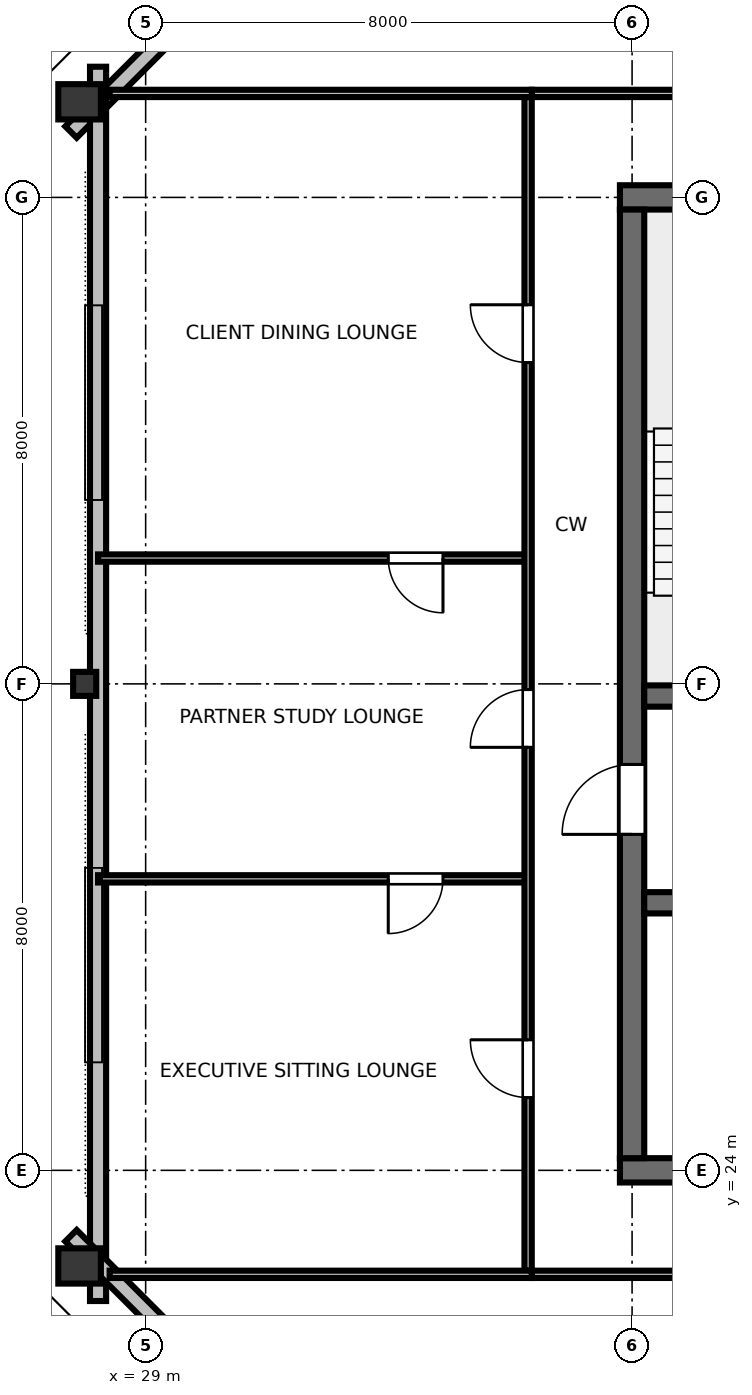
"""IFC4 building model, lengths in metres.
Left out: names, types, materials, properties, quantities, classifications, styles, units other than length and angle.
Written with IfcOpenShell. Run it as: python <this file> out.ifc"""

import sys

from ifc_helpers import new_model, si_unit, direction, frame, frame_2d, origin, origin_2d, place, context, subcontext, project, spatial, rectangle, hollow_rectangle, i_section, extrude, element, fill, save


model = new_model("IFC4")
c1 = context("Model", 3, precision=1e-05, world=origin(), true_north=direction((0.0, 1.0)))
c2 = subcontext(c1, "Body", "Model", "MODEL_VIEW")
j1 = project(units=[si_unit("LENGTHUNIT", "METRE"), si_unit("PLANEANGLEUNIT", "RADIAN")], contexts=[c1])
p1 = place(None, origin())
s1 = spatial("IfcSite", under=j1, at=p1, CompositionType="ELEMENT")
p2 = place(p1, origin())
s2 = spatial("IfcBuilding", under=s1, at=p2, CompositionType="ELEMENT")
p3 = place(p2, frame((0.0, 0.0, 261.0)))
s3 = spatial("IfcBuildingStorey", under=s2, at=p3, CompositionType="ELEMENT", Elevation=261.0)
p4 = place(p3, frame((36.8, 24.0, 0.0), z_axis=(0.0, 0.0, 1.0), x_axis=(1.0, 0.0, 0.0)))
e1 = element("IfcWall", 1, at=p4, inside=s3, PredefinedType="SHEAR", context=c2, shape_type="SweptSolid", body=[
    extrude(rectangle(XDim=18.4, YDim=0.4, at=frame_2d((9.2, 0.0))), origin(), (0.0, 0.0, 1.0), 3.36),
])
p5 = place(p4, frame((13.4, 0.0, 0.0)))
e2 = element("IfcOpeningElement", 2, at=p5, cuts=e1, PredefinedType="OPENING", context=c2, shape_type="SweptSolid", body=[
    extrude(rectangle(XDim=1.6, YDim=2.15, at=frame_2d((0.8, 1.075))), frame((0.0, 0.21, 0.0), z_axis=(0.0, -1.0, 0.0), x_axis=(1.0, 0.0, 0.0)), (0.0, 0.0, 1.0), 0.42),
])
p6 = place(p3, frame((36.8, 40.0, 0.0), z_axis=(0.0, 0.0, 1.0), x_axis=(1.0, 0.0, 0.0)))
e3 = element("IfcWall", 3, at=p6, inside=s3, PredefinedType="SHEAR", context=c2, shape_type="SweptSolid", body=[
    extrude(rectangle(XDim=18.4, YDim=0.4, at=frame_2d((9.2, 0.0))), origin(), (0.0, 0.0, 1.0), 3.36),
])
p7 = place(p6, frame((8.7, 0.0, 0.0)))
e4 = element("IfcOpeningElement", 4, at=p7, cuts=e3, PredefinedType="OPENING", context=c2, shape_type="SweptSolid", body=[
    extrude(rectangle(XDim=1.0, YDim=2.15, at=frame_2d((0.5, 1.075))), frame((0.0, 0.21, 0.0), z_axis=(0.0, -1.0, 0.0), x_axis=(1.0, 0.0, 0.0)), (0.0, 0.0, 1.0), 0.42),
])
p8 = place(p3, frame((37.0, 24.2, 0.0), z_axis=(0.0, 0.0, 1.0), x_axis=(0.0, 1.0, 0.0)))
e5 = element("IfcWall", 5, at=p8, inside=s3, PredefinedType="SHEAR", context=c2, shape_type="SweptSolid", body=[
    extrude(rectangle(XDim=15.6, YDim=0.4, at=frame_2d((7.8, 0.0))), origin(), (0.0, 0.0, 1.0), 3.36),
])
p9 = place(p8, frame((5.325, 0.0, 0.0)))
e6 = element("IfcOpeningElement", 6, at=p9, cuts=e5, PredefinedType="OPENING", context=c2, shape_type="SweptSolid", body=[
    extrude(rectangle(XDim=1.15, YDim=2.15, at=frame_2d((0.575, 1.075))), frame((0.0, 0.21, 0.0), z_axis=(0.0, -1.0, 0.0), x_axis=(1.0, 0.0, 0.0)), (0.0, 0.0, 1.0), 0.42),
])
p10 = place(p3, frame((37.2, 31.8, 0.0), z_axis=(0.0, 0.0, 1.0), x_axis=(1.0, 0.0, 0.0)))
e7 = element("IfcWall", 7, at=p10, inside=s3, PredefinedType="SHEAR", context=c2, shape_type="SweptSolid", body=[
    extrude(rectangle(XDim=17.6, YDim=0.35, at=frame_2d((8.8, 0.0))), origin(), (0.0, 0.0, 1.0), 3.36),
])
p11 = place(p10, frame((0.85, 0.0, 0.0)))
e8 = element("IfcOpeningElement", 8, at=p11, cuts=e7, PredefinedType="OPENING", context=c2, shape_type="SweptSolid", body=[
    extrude(rectangle(XDim=1.1, YDim=2.15, at=frame_2d((0.55, 1.075))), frame((0.0, 0.185, 0.0), z_axis=(0.0, -1.0, 0.0), x_axis=(1.0, 0.0, 0.0)), (0.0, 0.0, 1.0), 0.37),
])
p12 = place(p10, frame((14.75, 0.0, 0.0)))
e9 = element("IfcOpeningElement", 9, at=p12, cuts=e7, PredefinedType="OPENING", context=c2, shape_type="SweptSolid", body=[
    extrude(rectangle(XDim=1.1, YDim=2.15, at=frame_2d((0.55, 1.075))), frame((0.0, 0.185, 0.0), z_axis=(0.0, -1.0, 0.0), x_axis=(1.0, 0.0, 0.0)), (0.0, 0.0, 1.0), 0.37),
])
p13 = place(p3, frame((37.2, 28.4, 0.0), z_axis=(0.0, 0.0, 1.0), x_axis=(1.0, 0.0, 0.0)))
e10 = element("IfcWall", 10, at=p13, inside=s3, PredefinedType="SHEAR", context=c2, shape_type="SweptSolid", body=[
    extrude(rectangle(XDim=17.6, YDim=0.35, at=frame_2d((8.8, 0.0))), origin(), (0.0, 0.0, 1.0), 3.36),
])
p14 = place(p3, frame((27.914, 41.572, 0.0), z_axis=(0.0, 0.0, 1.0), x_axis=(0.0, 1.0, 0.0)))
e11 = element("IfcColumn", 11, at=p14, inside=s3, PredefinedType="COLUMN", context=c2, shape_type="SweptSolid", body=[
    extrude(hollow_rectangle(XDim=0.58, YDim=0.7, WallThickness=0.032, at=origin_2d()), origin(), (0.0, 0.0, 1.0), 3.373),
])
p15 = place(p3, frame((27.997, 32.0, 0.0), z_axis=(0.0, 0.0, 1.0), x_axis=(0.0, 1.0, 0.0)))
e12 = element("IfcColumn", 12, at=p15, inside=s3, PredefinedType="COLUMN", context=c2, shape_type="SweptSolid", body=[
    extrude(i_section(OverallWidth=0.395, OverallDepth=0.38, WebThickness=0.019, FlangeThickness=0.03, FilletRadius=0.025, at=origin_2d()), origin(), (0.0, 0.0, 1.0), 3.373),
])
p16 = place(p3, frame((27.914, 22.428, 0.0), z_axis=(0.0, 0.0, 1.0), x_axis=(0.0, 1.0, 0.0)))
e13 = element("IfcColumn", 13, at=p16, inside=s3, PredefinedType="COLUMN", context=c2, shape_type="SweptSolid", body=[
    extrude(hollow_rectangle(XDim=0.58, YDim=0.7, WallThickness=0.032, at=origin_2d()), origin(), (0.0, 0.0, 1.0), 3.373),
])
p17 = place(p3, frame((35.53, 48.832, 0.0), z_axis=(0.0, 0.0, 1.0), x_axis=(-0.707106781187, -0.707106781187, 0.0)))
e14 = element("IfcWall", 14, at=p17, inside=s3, PredefinedType="STANDARD", context=c2, shape_type="SweptSolid", body=[
    extrude(rectangle(XDim=10.971, YDim=0.265, at=frame_2d((5.485, 0.0))), origin(), (0.0, 0.0, 1.0), 2.832),
])
p18 = place(p3, frame((28.217, 42.149, 0.0), z_axis=(0.0, 0.0, 1.0), x_axis=(0.0, -1.0, 0.0)))
e15 = element("IfcWall", 15, at=p18, inside=s3, PredefinedType="STANDARD", context=c2, shape_type="SweptSolid", body=[
    extrude(rectangle(XDim=20.298, YDim=0.265, at=frame_2d((10.149, 0.0))), origin(), (0.0, 0.0, 1.0), 2.832),
])
p19 = place(p3, frame((27.772, 22.925, 0.0), z_axis=(0.0, 0.0, 1.0), x_axis=(0.707106781187, -0.707106781187, 0.0)))
e16 = element("IfcWall", 16, at=p19, inside=s3, PredefinedType="STANDARD", context=c2, shape_type="SweptSolid", body=[
    extrude(rectangle(XDim=10.971, YDim=0.265, at=frame_2d((5.485, 0.0))), origin(), (0.0, 0.0, 1.0), 2.832),
])
p20 = place(p3, frame((35.35, 22.29, 0.0), z_axis=(0.0, 0.0, 1.0), x_axis=(1.0, 0.0, 0.0)))
e17 = element("IfcWall", 17, at=p20, inside=s3, PredefinedType="PARTITIONING", context=c2, shape_type="SweptSolid", body=[
    extrude(rectangle(XDim=21.3, YDim=0.12, at=frame_2d((10.65, 0.0))), origin(), (0.0, 0.0, 1.0), 2.655),
])
p21 = place(p20, frame((4.425, 0.0, 0.0)))
e18 = element("IfcOpeningElement", 18, at=p21, cuts=e17, PredefinedType="OPENING", context=c2, shape_type="SweptSolid", body=[
    extrude(rectangle(XDim=0.95, YDim=2.15, at=frame_2d((0.475, 1.075))), frame((0.0, 0.07, 0.0), z_axis=(0.0, -1.0, 0.0), x_axis=(1.0, 0.0, 0.0)), (0.0, 0.0, 1.0), 0.14),
])
p22 = place(p20, frame((13.051, 0.0, 0.0)))
e19 = element("IfcOpeningElement", 19, at=p22, cuts=e17, PredefinedType="OPENING", context=c2, shape_type="SweptSolid", body=[
    extrude(rectangle(XDim=0.95, YDim=2.15, at=frame_2d((0.475, 1.075))), frame((0.0, 0.07, 0.0), z_axis=(0.0, -1.0, 0.0), x_axis=(1.0, 0.0, 0.0)), (0.0, 0.0, 1.0), 0.14),
])
p23 = place(p20, frame((17.811, 0.0, 0.0)))
e20 = element("IfcOpeningElement", 20, at=p23, cuts=e17, PredefinedType="OPENING", context=c2, shape_type="SweptSolid", body=[
    extrude(rectangle(XDim=0.95, YDim=2.15, at=frame_2d((0.475, 1.075))), frame((0.0, 0.07, 0.0), z_axis=(0.0, -1.0, 0.0), x_axis=(1.0, 0.0, 0.0)), (0.0, 0.0, 1.0), 0.14),
])
p24 = place(p3, frame((35.35, 41.71, 0.0), z_axis=(0.0, 0.0, 1.0), x_axis=(1.0, 0.0, 0.0)))
e21 = element("IfcWall", 21, at=p24, inside=s3, PredefinedType="PARTITIONING", context=c2, shape_type="SweptSolid", body=[
    extrude(rectangle(XDim=21.3, YDim=0.12, at=frame_2d((10.65, 0.0))), origin(), (0.0, 0.0, 1.0), 2.655),
])
p25 = place(p24, frame((4.361, 0.0, 0.0)))
e22 = element("IfcOpeningElement", 22, at=p25, cuts=e21, PredefinedType="OPENING", context=c2, shape_type="SweptSolid", body=[
    extrude(rectangle(XDim=0.95, YDim=2.15, at=frame_2d((0.475, 1.075))), frame((0.0, 0.07, 0.0), z_axis=(0.0, -1.0, 0.0), x_axis=(1.0, 0.0, 0.0)), (0.0, 0.0, 1.0), 0.14),
])
p26 = place(p24, frame((15.925, 0.0, 0.0)))
e23 = element("IfcOpeningElement", 23, at=p26, cuts=e21, PredefinedType="OPENING", context=c2, shape_type="SweptSolid", body=[
    extrude(rectangle(XDim=0.95, YDim=2.15, at=frame_2d((0.475, 1.075))), frame((0.0, 0.07, 0.0), z_axis=(0.0, -1.0, 0.0), x_axis=(1.0, 0.0, 0.0)), (0.0, 0.0, 1.0), 0.14),
])
p27 = place(p3, frame((35.29, 28.794, 0.0), z_axis=(0.0, 0.0, 1.0), x_axis=(-1.0, 0.0, 0.0)))
e24 = element("IfcWall", 24, at=p27, inside=s3, PredefinedType="PARTITIONING", context=c2, shape_type="SweptSolid", body=[
    extrude(rectangle(XDim=7.073, YDim=0.12, at=frame_2d((3.536, 0.0))), origin(), (0.0, 0.0, 1.0), 2.655),
])
p28 = place(p27, frame((1.4, 0.0, 0.0)))
e25 = element("IfcOpeningElement", 25, at=p28, cuts=e24, PredefinedType="OPENING", context=c2, shape_type="SweptSolid", body=[
    extrude(rectangle(XDim=0.9, YDim=2.15, at=frame_2d((0.45, 1.075))), frame((0.0, 0.07, 0.0), z_axis=(0.0, -1.0, 0.0), x_axis=(1.0, 0.0, 0.0)), (0.0, 0.0, 1.0), 0.14),
])
p29 = place(p3, frame((35.29, 34.069, 0.0), z_axis=(0.0, 0.0, 1.0), x_axis=(-1.0, 0.0, 0.0)))
e26 = element("IfcWall", 26, at=p29, inside=s3, PredefinedType="PARTITIONING", context=c2, shape_type="SweptSolid", body=[
    extrude(rectangle(XDim=7.073, YDim=0.12, at=frame_2d((3.536, 0.0))), origin(), (0.0, 0.0, 1.0), 2.655),
])
p30 = place(p29, frame((1.4, 0.0, 0.0)))
e27 = element("IfcOpeningElement", 27, at=p30, cuts=e26, PredefinedType="OPENING", context=c2, shape_type="SweptSolid", body=[
    extrude(rectangle(XDim=0.9, YDim=2.15, at=frame_2d((0.45, 1.075))), frame((0.0, 0.07, 0.0), z_axis=(0.0, -1.0, 0.0), x_axis=(1.0, 0.0, 0.0)), (0.0, 0.0, 1.0), 0.14),
])
p31 = place(p3, frame((35.29, 22.35, 0.0), z_axis=(0.0, 0.0, 1.0), x_axis=(0.0, 1.0, 0.0)))
e28 = element("IfcWall", 28, at=p31, inside=s3, PredefinedType="PARTITIONING", context=c2, shape_type="SweptSolid", body=[
    extrude(rectangle(XDim=19.3, YDim=0.12, at=frame_2d((9.65, 0.0))), origin(), (0.0, 0.0, 1.0), 2.655),
])
p32 = place(p31, frame((2.847, 0.0, 0.0)))
e29 = element("IfcOpeningElement", 29, at=p32, cuts=e28, PredefinedType="OPENING", context=c2, shape_type="SweptSolid", body=[
    extrude(rectangle(XDim=0.95, YDim=2.15, at=frame_2d((0.475, 1.075))), frame((0.0, 0.07, 0.0), z_axis=(0.0, -1.0, 0.0), x_axis=(1.0, 0.0, 0.0)), (0.0, 0.0, 1.0), 0.14),
])
p33 = place(p31, frame((8.606, 0.0, 0.0)))
e30 = element("IfcOpeningElement", 30, at=p33, cuts=e28, PredefinedType="OPENING", context=c2, shape_type="SweptSolid", body=[
    extrude(rectangle(XDim=0.95, YDim=2.15, at=frame_2d((0.475, 1.075))), frame((0.0, 0.07, 0.0), z_axis=(0.0, -1.0, 0.0), x_axis=(1.0, 0.0, 0.0)), (0.0, 0.0, 1.0), 0.14),
])
p34 = place(p31, frame((14.935, 0.0, 0.0)))
e31 = element("IfcOpeningElement", 31, at=p34, cuts=e28, PredefinedType="OPENING", context=c2, shape_type="SweptSolid", body=[
    extrude(rectangle(XDim=0.95, YDim=2.15, at=frame_2d((0.475, 1.075))), frame((0.0, 0.07, 0.0), z_axis=(0.0, -1.0, 0.0), x_axis=(1.0, 0.0, 0.0)), (0.0, 0.0, 1.0), 0.14),
])
for number, where, z_axis, x_axis in (
    (32, (35.35, 22.29, 0.0), (0.0, 0.0, 1.0), (-1.0, 0.0, 0.0)),
    (33, (35.35, 41.71, 0.0), (0.0, 0.0, 1.0), (-1.0, 0.0, 0.0)),
):
    element("IfcWall", number, at=place(p3, frame(where, z_axis=z_axis, x_axis=x_axis)), inside=s3, PredefinedType="PARTITIONING", context=c2, shape_type="SweptSolid", body=[
        extrude(rectangle(XDim=6.942, YDim=0.12, at=frame_2d((3.471, 0.0))), origin(), (0.0, 0.0, 1.0), 2.655),
    ])
p35 = place(p9, origin())
e34 = element("IfcDoor", 34, at=p35, inside=s3, OperationType="SINGLE_SWING_LEFT", PredefinedType="DOOR", context=c2, shape_type="SweptSolid", body=[
    extrude(rectangle(XDim=1.15, YDim=2.15, at=frame_2d((0.575, 1.075))), frame((0.0, 0.025, 0.0), z_axis=(0.0, -1.0, 0.0), x_axis=(1.0, 0.0, 0.0)), (0.0, 0.0, 1.0), 0.05),
])
fill(e6, e34)
p36 = place(p28, origin())
e35 = element("IfcDoor", 35, at=p36, inside=s3, OperationType="SINGLE_SWING_RIGHT", PredefinedType="DOOR", context=c2, shape_type="SweptSolid", body=[
    extrude(rectangle(XDim=0.9, YDim=2.15, at=frame_2d((0.45, 1.075))), frame((0.0, 0.025, 0.0), z_axis=(0.0, -1.0, 0.0), x_axis=(1.0, 0.0, 0.0)), (0.0, 0.0, 1.0), 0.05),
])
fill(e25, e35)
p37 = place(p30, origin())
e36 = element("IfcDoor", 36, at=p37, inside=s3, OperationType="SINGLE_SWING_LEFT", PredefinedType="DOOR", context=c2, shape_type="SweptSolid", body=[
    extrude(rectangle(XDim=0.9, YDim=2.15, at=frame_2d((0.45, 1.075))), frame((0.0, 0.025, 0.0), z_axis=(0.0, -1.0, 0.0), x_axis=(1.0, 0.0, 0.0)), (0.0, 0.0, 1.0), 0.05),
])
fill(e27, e36)
p38 = place(p32, origin())
e37 = element("IfcDoor", 37, at=p38, inside=s3, OperationType="SINGLE_SWING_RIGHT", PredefinedType="DOOR", context=c2, shape_type="SweptSolid", body=[
    extrude(rectangle(XDim=0.95, YDim=2.15, at=frame_2d((0.475, 1.075))), frame((0.0, 0.025, 0.0), z_axis=(0.0, -1.0, 0.0), x_axis=(1.0, 0.0, 0.0)), (0.0, 0.0, 1.0), 0.05),
])
fill(e29, e37)
p39 = place(p33, origin())
e38 = element("IfcDoor", 38, at=p39, inside=s3, OperationType="SINGLE_SWING_LEFT", PredefinedType="DOOR", context=c2, shape_type="SweptSolid", body=[
    extrude(rectangle(XDim=0.95, YDim=2.15, at=frame_2d((0.475, 1.075))), frame((0.0, 0.025, 0.0), z_axis=(0.0, -1.0, 0.0), x_axis=(1.0, 0.0, 0.0)), (0.0, 0.0, 1.0), 0.05),
])
fill(e30, e38)
p40 = place(p34, origin())
e39 = element("IfcDoor", 39, at=p40, inside=s3, OperationType="SINGLE_SWING_RIGHT", PredefinedType="DOOR", context=c2, shape_type="SweptSolid", body=[
    extrude(rectangle(XDim=0.95, YDim=2.15, at=frame_2d((0.475, 1.075))), frame((0.0, 0.025, 0.0), z_axis=(0.0, -1.0, 0.0), x_axis=(1.0, 0.0, 0.0)), (0.0, 0.0, 1.0), 0.05),
])
fill(e31, e39)
save(model, sys.argv[1])
